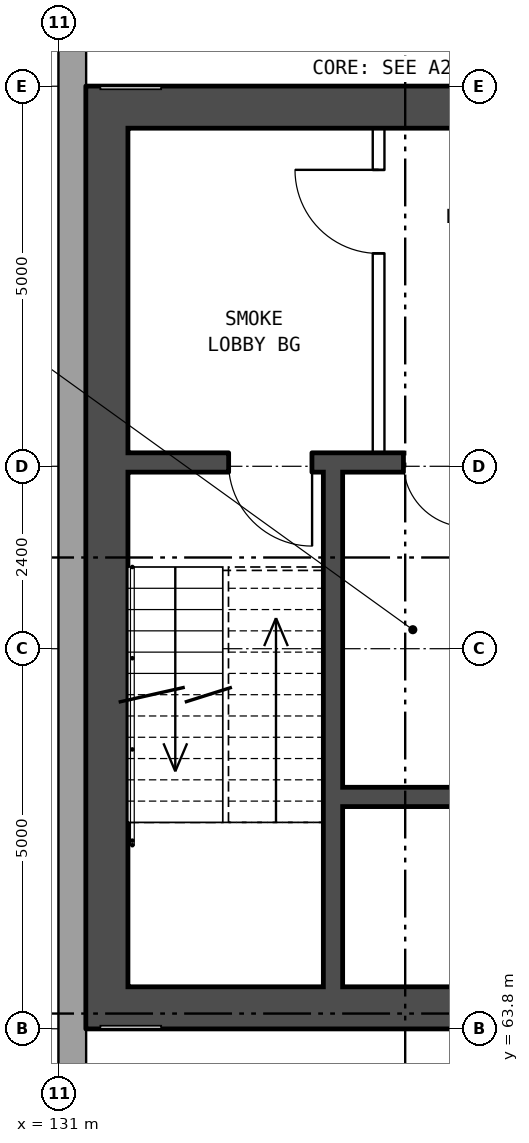
"""IFC4 building model, lengths in metres.
Left out: names, types, materials, properties, quantities, classifications, styles, units other than length and angle.
Written with IfcOpenShell. Run it as: python <this file> out.ifc"""

import sys

from ifc_helpers import new_model, si_unit, direction, frame, frame_2d, origin, place, context, subcontext, project, spatial, rectangle, extrude, element, fill, save


model = new_model("IFC4")
c1 = context("Model", 3, precision=1e-05, world=origin(), true_north=direction((0.0, 1.0)))
c2 = subcontext(c1, "Body", "Model", "MODEL_VIEW")
j1 = project(units=[si_unit("LENGTHUNIT", "METRE"), si_unit("PLANEANGLEUNIT", "RADIAN")], contexts=[c1])
p1 = place(None, origin())
s1 = spatial("IfcSite", under=j1, at=p1, CompositionType="ELEMENT")
p2 = place(p1, origin())
s2 = spatial("IfcBuilding", under=s1, at=p2, CompositionType="ELEMENT")
p3 = place(p2, frame((0.0, 0.0, 115.0)))
s3 = spatial("IfcBuildingStorey", under=s2, at=p3, CompositionType="ELEMENT", Elevation=115.0)
p4 = place(p3, frame((131.18, 82.925, 0.0), z_axis=(0.0, 0.0, 1.0), x_axis=(0.0, -1.0, 0.0)))
e1 = element("IfcWall", 1, at=p4, inside=s3, PredefinedType="STANDARD", context=c2, shape_type="SweptSolid", body=[
    extrude(rectangle(XDim=25.851, YDim=0.36, at=frame_2d((12.925, 0.0))), origin(), (0.0, 0.0, 1.0), 4.2),
])
p5 = place(p4, frame((2.9, 0.0, 1.5)))
e2 = element("IfcOpeningElement", 2, at=p5, cuts=e1, PredefinedType="OPENING", context=c2, shape_type="SweptSolid", body=[
    extrude(rectangle(XDim=0.6, YDim=1.2, at=frame_2d((0.3, 0.6))), frame((0.0, 0.19, 0.0), z_axis=(0.0, -1.0, 0.0), x_axis=(1.0, 0.0, 0.0)), (0.0, 0.0, 1.0), 0.38),
])
p6 = place(p4, frame((4.625, 0.0, 1.5)))
e3 = element("IfcOpeningElement", 3, at=p6, cuts=e1, PredefinedType="OPENING", context=c2, shape_type="SweptSolid", body=[
    extrude(rectangle(XDim=1.6, YDim=1.2, at=frame_2d((0.8, 0.6))), frame((0.0, 0.19, 0.0), z_axis=(0.0, -1.0, 0.0), x_axis=(1.0, 0.0, 0.0)), (0.0, 0.0, 1.0), 0.38),
])
p7 = place(p4, frame((21.1, 0.0, 1.5)))
e4 = element("IfcOpeningElement", 4, at=p7, cuts=e1, PredefinedType="OPENING", context=c2, shape_type="SweptSolid", body=[
    extrude(rectangle(XDim=0.6, YDim=1.2, at=frame_2d((0.3, 0.6))), frame((0.0, 0.19, 0.0), z_axis=(0.0, -1.0, 0.0), x_axis=(1.0, 0.0, 0.0)), (0.0, 0.0, 1.0), 0.38),
])
p8 = place(p4, frame((22.325, 0.0, 1.5)))
e5 = element("IfcOpeningElement", 5, at=p8, cuts=e1, PredefinedType="OPENING", context=c2, shape_type="SweptSolid", body=[
    extrude(rectangle(XDim=0.6, YDim=1.2, at=frame_2d((0.3, 0.6))), frame((0.0, 0.19, 0.0), z_axis=(0.0, -1.0, 0.0), x_axis=(1.0, 0.0, 0.0)), (0.0, 0.0, 1.0), 0.38),
])
p9 = place(p3, frame((131.635, 63.8, 0.0), z_axis=(0.0, 0.0, 1.0), x_axis=(0.0, 1.0, 0.0)))
e6 = element("IfcWall", 6, at=p9, inside=s3, PredefinedType="SHEAR", context=c2, shape_type="SweptSolid", body=[
    extrude(rectangle(XDim=12.4, YDim=0.55, at=frame_2d((6.2, 0.0))), origin(), (0.0, 0.0, 1.0), 4.2),
])
for number, where, z_axis, x_axis in (
    (7, (139.21, 64.075, 0.0), (0.0, 0.0, 1.0), (-1.0, 0.0, 0.0)),
    (8, (139.21, 75.925, 0.0), (0.0, 0.0, 1.0), (-1.0, 0.0, 0.0)),
):
    element("IfcWall", number, at=place(p3, frame(where, z_axis=z_axis, x_axis=x_axis)), inside=s3, PredefinedType="SHEAR", context=c2, shape_type="SweptSolid", body=[
        extrude(rectangle(XDim=7.3, YDim=0.55, at=frame_2d((3.65, 0.0))), origin(), (0.0, 0.0, 1.0), 4.2),
    ])
p10 = place(p3, frame((139.21, 66.85, 0.0), z_axis=(0.0, 0.0, 1.0), x_axis=(-1.0, 0.0, 0.0)))
e9 = element("IfcWall", 9, at=p10, inside=s3, PredefinedType="SHEAR", context=c2, shape_type="SweptSolid", body=[
    extrude(rectangle(XDim=4.475, YDim=0.25, at=frame_2d((2.237, 0.0))), origin(), (0.0, 0.0, 1.0), 4.2),
])
p11 = place(p3, frame((139.21, 71.25, 0.0), z_axis=(0.0, 0.0, 1.0), x_axis=(-1.0, 0.0, 0.0)))
e10 = element("IfcWall", 10, at=p11, inside=s3, PredefinedType="SHEAR", context=c2, shape_type="SweptSolid", body=[
    extrude(rectangle(XDim=7.3, YDim=0.25, at=frame_2d((3.65, 0.0))), origin(), (0.0, 0.0, 1.0), 4.2),
])
p12 = place(p11, frame((4.875, 0.0, 0.0)))
e11 = element("IfcOpeningElement", 11, at=p12, cuts=e10, PredefinedType="OPENING", context=c2, shape_type="SweptSolid", body=[
    extrude(rectangle(XDim=1.1, YDim=2.1, at=frame_2d((0.55, 1.05))), frame((0.0, 0.135, 0.0), z_axis=(0.0, -1.0, 0.0), x_axis=(1.0, 0.0, 0.0)), (0.0, 0.0, 1.0), 0.27),
])
p13 = place(p11, frame((2.825, 0.0, 0.0)))
e12 = element("IfcOpeningElement", 12, at=p13, cuts=e10, PredefinedType="OPENING", context=c2, shape_type="SweptSolid", body=[
    extrude(rectangle(XDim=0.85, YDim=2.1, at=frame_2d((0.425, 1.05))), frame((0.0, 0.135, 0.0), z_axis=(0.0, -1.0, 0.0), x_axis=(1.0, 0.0, 0.0)), (0.0, 0.0, 1.0), 0.27),
])
p14 = place(p3, frame((135.21, 71.375, 0.0), z_axis=(0.0, 0.0, 1.0), x_axis=(0.0, 1.0, 0.0)))
e13 = element("IfcWall", 13, at=p14, inside=s3, PredefinedType="PARTITIONING", context=c2, shape_type="SweptSolid", body=[
    extrude(rectangle(XDim=4.275, YDim=0.15, at=frame_2d((2.137, 0.0))), origin(), (0.0, 0.0, 1.0), 4.2),
])
p15 = place(p14, frame((2.625, 0.0, 0.0)))
e14 = element("IfcOpeningElement", 14, at=p15, cuts=e13, PredefinedType="OPENING", context=c2, shape_type="SweptSolid", body=[
    extrude(rectangle(XDim=1.1, YDim=2.1, at=frame_2d((0.55, 1.05))), frame((0.0, 0.085, 0.0), z_axis=(0.0, -1.0, 0.0), x_axis=(1.0, 0.0, 0.0)), (0.0, 0.0, 1.0), 0.17),
])
p16 = place(p3, frame((134.61, 64.35, 0.0), z_axis=(0.0, 0.0, 1.0), x_axis=(0.0, 1.0, 0.0)))
e15 = element("IfcWall", 15, at=p16, inside=s3, PredefinedType="SHEAR", context=c2, shape_type="SweptSolid", body=[
    extrude(rectangle(XDim=6.775, YDim=0.25, at=frame_2d((3.387, 0.0))), origin(), (0.0, 0.0, 1.0), 4.2),
])
p17 = place(p15, origin())
e16 = element("IfcDoor", 16, at=p17, inside=s3, OperationType="SINGLE_SWING_RIGHT", PredefinedType="DOOR", context=c2, shape_type="SweptSolid", body=[
    extrude(rectangle(XDim=1.1, YDim=2.1, at=frame_2d((0.55, 1.05))), frame((0.0, 0.025, 0.0), z_axis=(0.0, -1.0, 0.0), x_axis=(1.0, 0.0, 0.0)), (0.0, 0.0, 1.0), 0.05),
])
fill(e14, e16)
p18 = place(p12, origin())
e17 = element("IfcDoor", 17, at=p18, inside=s3, OperationType="SINGLE_SWING_LEFT", PredefinedType="DOOR", context=c2, shape_type="SweptSolid", body=[
    extrude(rectangle(XDim=1.1, YDim=2.1, at=frame_2d((0.55, 1.05))), frame((0.0, 0.025, 0.0), z_axis=(0.0, -1.0, 0.0), x_axis=(1.0, 0.0, 0.0)), (0.0, 0.0, 1.0), 0.05),
])
fill(e11, e17)
p19 = place(p13, origin())
e18 = element("IfcDoor", 18, at=p19, inside=s3, OperationType="SINGLE_SWING_LEFT", PredefinedType="DOOR", context=c2, shape_type="SweptSolid", body=[
    extrude(rectangle(XDim=0.85, YDim=2.1, at=frame_2d((0.425, 1.05))), frame((0.0, 0.025, 0.0), z_axis=(0.0, -1.0, 0.0), x_axis=(1.0, 0.0, 0.0)), (0.0, 0.0, 1.0), 0.05),
])
fill(e12, e18)
save(model, sys.argv[1])
